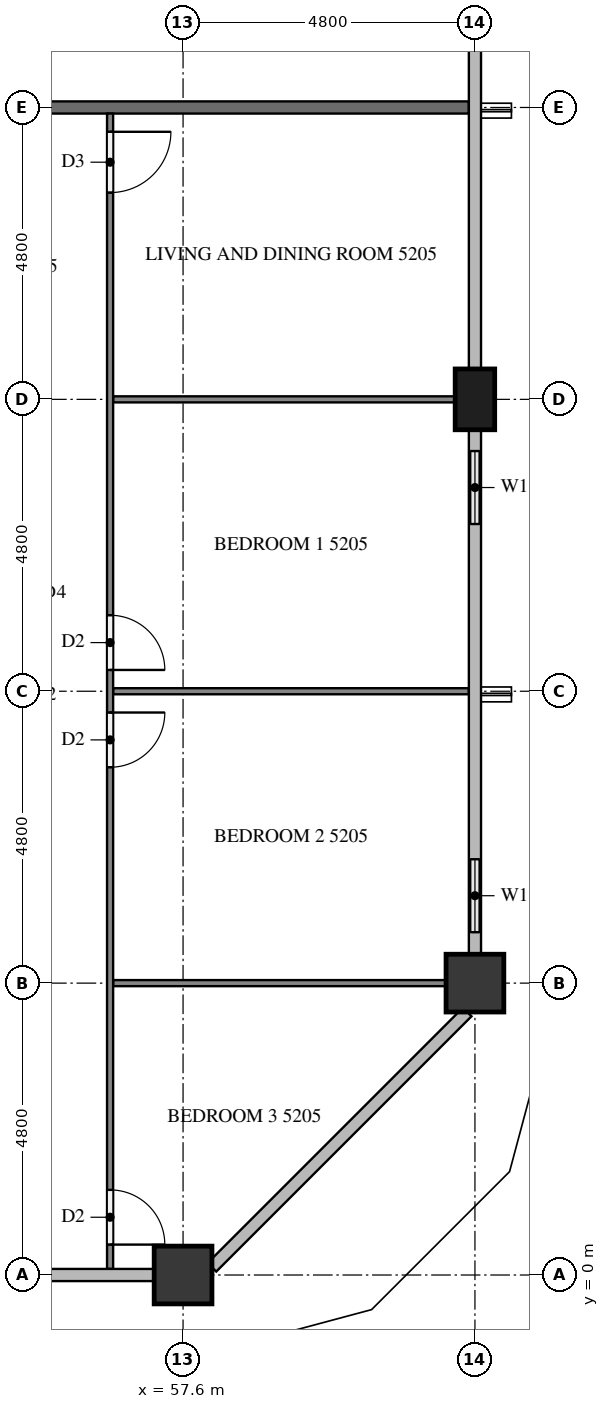
"""IFC4 building model, lengths in metres.
Left out: names, types, materials, properties, quantities, classifications, styles, units other than length and angle.
Written with IfcOpenShell. Run it as: python <this file> out.ifc"""

import sys

from ifc_helpers import new_model, si_unit, direction, frame, frame_2d, origin, origin_2d, place, context, subcontext, project, spatial, rectangle, extrude, element, fill, save


model = new_model("IFC4")
c1 = context("Model", 3, precision=1e-05, world=origin(), true_north=direction((0.0, 1.0)))
c2 = subcontext(c1, "Body", "Model", "MODEL_VIEW")
j1 = project(units=[si_unit("LENGTHUNIT", "METRE"), si_unit("PLANEANGLEUNIT", "RADIAN")], contexts=[c1])
p1 = place(None, origin())
s1 = spatial("IfcSite", under=j1, at=p1, CompositionType="ELEMENT")
p2 = place(p1, origin())
s2 = spatial("IfcBuilding", under=s1, at=p2, CompositionType="ELEMENT")
p3 = place(p2, frame((0.0, 0.0, 199.9)))
s3 = spatial("IfcBuildingStorey", under=s2, at=p3, CompositionType="ELEMENT", Elevation=199.9)
for number, where, z_axis, x_axis in (
    (1, (57.6, 0.0, 0.0), (0.0, 0.0, 1.0), (1.0, 0.0, 0.0)),
    (2, (62.4, 4.8, 0.0), (0.0, 0.0, 1.0), (1.0, 0.0, 0.0)),
):
    element("IfcColumn", number, at=place(p3, frame(where, z_axis=z_axis, x_axis=x_axis)), inside=s3, PredefinedType="COLUMN", context=c2, shape_type="SweptSolid", body=[
        extrude(rectangle(XDim=0.95, YDim=0.95, at=origin_2d()), origin(), (0.0, 0.0, 1.0), 3.1),
    ])
p4 = place(p3, frame((62.4, 14.4, 0.0), z_axis=(0.0, 0.0, 1.0), x_axis=(0.0, 1.0, 0.0)))
e3 = element("IfcColumn", 3, at=p4, inside=s3, PredefinedType="COLUMN", context=c2, shape_type="SweptSolid", body=[
    extrude(rectangle(XDim=1.0, YDim=0.65, at=origin_2d()), origin(), (0.0, 0.0, 1.0), 3.1),
])
p5 = place(p3, frame((62.4, 5.275, 0.0), z_axis=(0.0, 0.0, 1.0), x_axis=(0.0, 1.0, 0.0)))
e4 = element("IfcWall", 4, at=p5, inside=s3, PredefinedType="SOLIDWALL", context=c2, shape_type="SweptSolid", body=[
    extrude(rectangle(XDim=1.925, YDim=0.15, at=frame_2d((0.962, 0.0))), origin(), (0.0, 0.0, 1.0), 3.1),
])
p6 = place(p5, frame((0.363, 0.0, 0.9)))
e5 = element("IfcOpeningElement", 5, at=p6, cuts=e4, PredefinedType="OPENING", context=c2, shape_type="SweptSolid", body=[
    extrude(rectangle(XDim=1.2, YDim=1.4, at=frame_2d((0.6, 0.7))), frame((0.0, 0.085, 0.0), z_axis=(0.0, -1.0, 0.0), x_axis=(1.0, 0.0, 0.0)), (0.0, 0.0, 1.0), 0.17),
])
p7 = place(p3, frame((62.4, 12.0, 0.0), z_axis=(0.0, 0.0, 1.0), x_axis=(0.0, 1.0, 0.0)))
e6 = element("IfcWall", 6, at=p7, inside=s3, PredefinedType="SOLIDWALL", context=c2, shape_type="SweptSolid", body=[
    extrude(rectangle(XDim=1.9, YDim=0.15, at=frame_2d((0.95, 0.0))), origin(), (0.0, 0.0, 1.0), 3.1),
])
p8 = place(p7, frame((0.35, 0.0, 0.9)))
e7 = element("IfcOpeningElement", 7, at=p8, cuts=e6, PredefinedType="OPENING", context=c2, shape_type="SweptSolid", body=[
    extrude(rectangle(XDim=1.2, YDim=1.4, at=frame_2d((0.6, 0.7))), frame((0.0, 0.085, 0.0), z_axis=(0.0, -1.0, 0.0), x_axis=(1.0, 0.0, 0.0)), (0.0, 0.0, 1.0), 0.17),
])
p9 = place(p3, frame((50.5, 19.2, 0.0), z_axis=(0.0, 0.0, 1.0), x_axis=(1.0, 0.0, 0.0)))
e8 = element("IfcWall", 8, at=p9, inside=s3, PredefinedType="PARTITIONING", context=c2, shape_type="SweptSolid", body=[
    extrude(rectangle(XDim=11.8, YDim=0.2, at=frame_2d((5.9, 0.0))), origin(), (0.0, 0.0, 1.0), 3.1),
])
p10 = place(p3, frame((56.45, 14.4, 0.0), z_axis=(0.0, 0.0, 1.0), x_axis=(1.0, 0.0, 0.0)))
e9 = element("IfcWall", 9, at=p10, inside=s3, PredefinedType="PARTITIONING", context=c2, shape_type="SweptSolid", body=[
    extrude(rectangle(XDim=5.625, YDim=0.1, at=frame_2d((2.812, 0.0))), origin(), (0.0, 0.0, 1.0), 3.1),
])
p11 = place(p3, frame((56.45, 9.6, 0.0), z_axis=(0.0, 0.0, 1.0), x_axis=(1.0, 0.0, 0.0)))
e10 = element("IfcWall", 10, at=p11, inside=s3, PredefinedType="PARTITIONING", context=c2, shape_type="SweptSolid", body=[
    extrude(rectangle(XDim=5.85, YDim=0.1, at=frame_2d((2.925, 0.0))), origin(), (0.0, 0.0, 1.0), 3.1),
])
p12 = place(p3, frame((56.45, 4.8, 0.0), z_axis=(0.0, 0.0, 1.0), x_axis=(1.0, 0.0, 0.0)))
e11 = element("IfcWall", 11, at=p12, inside=s3, PredefinedType="PARTITIONING", context=c2, shape_type="SweptSolid", body=[
    extrude(rectangle(XDim=5.475, YDim=0.1, at=frame_2d((2.738, 0.0))), origin(), (0.0, 0.0, 1.0), 3.1),
])
p13 = place(p3, frame((56.4, 19.1, 0.0), z_axis=(0.0, 0.0, 1.0), x_axis=(0.0, -1.0, 0.0)))
e12 = element("IfcWall", 12, at=p13, inside=s3, PredefinedType="PARTITIONING", context=c2, shape_type="SweptSolid", body=[
    extrude(rectangle(XDim=19.0, YDim=0.1, at=frame_2d((9.5, 0.0))), origin(), (0.0, 0.0, 1.0), 3.1),
])
p14 = place(p13, frame((0.3, 0.0, 0.0)))
e13 = element("IfcOpeningElement", 13, at=p14, cuts=e12, PredefinedType="OPENING", context=c2, shape_type="SweptSolid", body=[
    extrude(rectangle(XDim=1.0, YDim=2.1, at=frame_2d((0.5, 1.05))), frame((0.0, 0.06, 0.0), z_axis=(0.0, -1.0, 0.0), x_axis=(1.0, 0.0, 0.0)), (0.0, 0.0, 1.0), 0.12),
])
p15 = place(p13, frame((8.25, 0.0, 0.0)))
e14 = element("IfcOpeningElement", 14, at=p15, cuts=e12, PredefinedType="OPENING", context=c2, shape_type="SweptSolid", body=[
    extrude(rectangle(XDim=0.9, YDim=2.1, at=frame_2d((0.45, 1.05))), frame((0.0, 0.06, 0.0), z_axis=(0.0, -1.0, 0.0), x_axis=(1.0, 0.0, 0.0)), (0.0, 0.0, 1.0), 0.12),
])
p16 = place(p13, frame((9.85, 0.0, 0.0)))
e15 = element("IfcOpeningElement", 15, at=p16, cuts=e12, PredefinedType="OPENING", context=c2, shape_type="SweptSolid", body=[
    extrude(rectangle(XDim=0.9, YDim=2.1, at=frame_2d((0.45, 1.05))), frame((0.0, 0.06, 0.0), z_axis=(0.0, -1.0, 0.0), x_axis=(1.0, 0.0, 0.0)), (0.0, 0.0, 1.0), 0.12),
])
p17 = place(p13, frame((17.7, 0.0, 0.0)))
e16 = element("IfcOpeningElement", 16, at=p17, cuts=e12, PredefinedType="OPENING", context=c2, shape_type="SweptSolid", body=[
    extrude(rectangle(XDim=0.9, YDim=2.1, at=frame_2d((0.45, 1.05))), frame((0.0, 0.06, 0.0), z_axis=(0.0, -1.0, 0.0), x_axis=(1.0, 0.0, 0.0)), (0.0, 0.0, 1.0), 0.12),
])
p18 = place(p6, origin())
e17 = element("IfcWindow", 17, at=p18, inside=s3, PartitioningType="SINGLE_PANEL", PredefinedType="WINDOW", context=c2, shape_type="SweptSolid", body=[
    extrude(rectangle(XDim=1.2, YDim=1.4, at=frame_2d((0.6, 0.7))), frame((0.0, 0.03, 0.0), z_axis=(0.0, -1.0, 0.0), x_axis=(1.0, 0.0, 0.0)), (0.0, 0.0, 1.0), 0.06),
])
fill(e5, e17)
p19 = place(p8, origin())
e18 = element("IfcWindow", 18, at=p19, inside=s3, PartitioningType="SINGLE_PANEL", PredefinedType="WINDOW", context=c2, shape_type="SweptSolid", body=[
    extrude(rectangle(XDim=1.2, YDim=1.4, at=frame_2d((0.6, 0.7))), frame((0.0, 0.03, 0.0), z_axis=(0.0, -1.0, 0.0), x_axis=(1.0, 0.0, 0.0)), (0.0, 0.0, 1.0), 0.06),
])
fill(e7, e18)
p20 = place(p14, origin())
e19 = element("IfcDoor", 19, at=p20, inside=s3, OperationType="SINGLE_SWING_LEFT", PredefinedType="DOOR", context=c2, shape_type="SweptSolid", body=[
    extrude(rectangle(XDim=1.0, YDim=2.1, at=frame_2d((0.5, 1.05))), frame((0.0, 0.025, 0.0), z_axis=(0.0, -1.0, 0.0), x_axis=(1.0, 0.0, 0.0)), (0.0, 0.0, 1.0), 0.05),
])
fill(e13, e19)
p21 = place(p15, origin())
e20 = element("IfcDoor", 20, at=p21, inside=s3, OperationType="SINGLE_SWING_RIGHT", PredefinedType="DOOR", context=c2, shape_type="SweptSolid", body=[
    extrude(rectangle(XDim=0.9, YDim=2.1, at=frame_2d((0.45, 1.05))), frame((0.0, 0.025, 0.0), z_axis=(0.0, -1.0, 0.0), x_axis=(1.0, 0.0, 0.0)), (0.0, 0.0, 1.0), 0.05),
])
fill(e14, e20)
p22 = place(p16, origin())
e21 = element("IfcDoor", 21, at=p22, inside=s3, OperationType="SINGLE_SWING_LEFT", PredefinedType="DOOR", context=c2, shape_type="SweptSolid", body=[
    extrude(rectangle(XDim=0.9, YDim=2.1, at=frame_2d((0.45, 1.05))), frame((0.0, 0.025, 0.0), z_axis=(0.0, -1.0, 0.0), x_axis=(1.0, 0.0, 0.0)), (0.0, 0.0, 1.0), 0.05),
])
fill(e15, e21)
p23 = place(p17, origin())
e22 = element("IfcDoor", 22, at=p23, inside=s3, OperationType="SINGLE_SWING_RIGHT", PredefinedType="DOOR", context=c2, shape_type="SweptSolid", body=[
    extrude(rectangle(XDim=0.9, YDim=2.1, at=frame_2d((0.45, 1.05))), frame((0.0, 0.025, 0.0), z_axis=(0.0, -1.0, 0.0), x_axis=(1.0, 0.0, 0.0)), (0.0, 0.0, 1.0), 0.05),
])
fill(e16, e22)
save(model, sys.argv[1])
